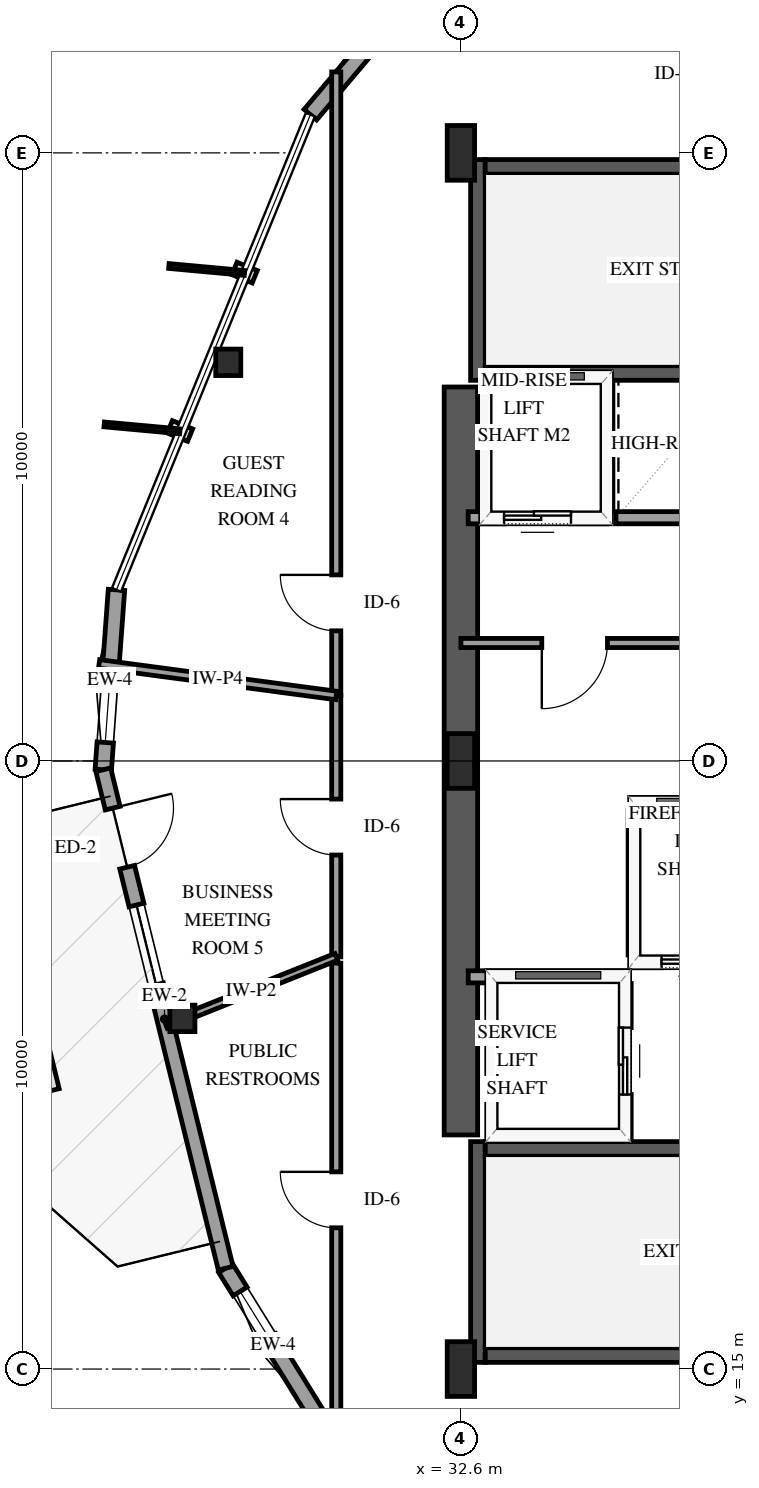
"""IFC4 building model, lengths in metres.
Left out: names, types, materials, properties, quantities, classifications, styles, units other than length and angle.
Written with IfcOpenShell. Run it as: python <this file> out.ifc"""

import sys

from ifc_helpers import new_model, si_unit, direction, frame, frame_2d, origin, origin_2d, place, context, subcontext, project, spatial, rectangle, i_section, extrude, element, fill, save


model = new_model("IFC4")
c1 = context("Model", 3, precision=1e-05, world=origin(), true_north=direction((0.0, 1.0)))
c2 = subcontext(c1, "Body", "Model", "MODEL_VIEW")
j1 = project(units=[si_unit("LENGTHUNIT", "METRE"), si_unit("PLANEANGLEUNIT", "RADIAN")], contexts=[c1])
p1 = place(None, origin())
s1 = spatial("IfcSite", under=j1, at=p1, CompositionType="ELEMENT")
p2 = place(p1, origin())
s2 = spatial("IfcBuilding", under=s1, at=p2, CompositionType="ELEMENT")
p3 = place(p2, frame((0.0, 0.0, 153.4)))
s3 = spatial("IfcBuildingStorey", under=s2, at=p3, CompositionType="ELEMENT", Elevation=153.4)
p4 = place(p3, frame((32.88, 15.11, 0.0), z_axis=(0.0, 0.0, 1.0), x_axis=(0.0, 1.0, 0.0)))
e1 = element("IfcWall", 1, at=p4, inside=s3, PredefinedType="SHEAR", context=c2, shape_type="SweptSolid", body=[
    extrude(rectangle(XDim=3.63, YDim=0.24, at=frame_2d((1.815, 0.0))), origin(), (0.0, 0.0, 1.0), 3.6),
])
for number, where, z_axis, x_axis in (
    (2, (33.0, 15.23, 0.0), (0.0, 0.0, 1.0), (1.0, 0.0, 0.0)),
    (3, (33.0, 18.62, 0.0), (0.0, 0.0, 1.0), (1.0, 0.0, 0.0)),
):
    element("IfcWall", number, at=place(p3, frame(where, z_axis=z_axis, x_axis=x_axis)), inside=s3, PredefinedType="SHEAR", context=c2, shape_type="SweptSolid", body=[
        extrude(rectangle(XDim=8.0, YDim=0.24, at=frame_2d((4.0, 0.0))), origin(), (0.0, 0.0, 1.0), 3.6),
    ])
p5 = place(p3, frame((32.88, 31.26, 0.0), z_axis=(0.0, 0.0, 1.0), x_axis=(0.0, 1.0, 0.0)))
e4 = element("IfcWall", 4, at=p5, inside=s3, PredefinedType="SHEAR", context=c2, shape_type="SweptSolid", body=[
    extrude(rectangle(XDim=3.63, YDim=0.24, at=frame_2d((1.815, 0.0))), origin(), (0.0, 0.0, 1.0), 3.6),
])
for number, where, z_axis, x_axis in (
    (5, (33.0, 31.38, 0.0), (0.0, 0.0, 1.0), (1.0, 0.0, 0.0)),
    (6, (33.0, 34.77, 0.0), (0.0, 0.0, 1.0), (1.0, 0.0, 0.0)),
):
    element("IfcWall", number, at=place(p3, frame(where, z_axis=z_axis, x_axis=x_axis)), inside=s3, PredefinedType="SHEAR", context=c2, shape_type="SweptSolid", body=[
        extrude(rectangle(XDim=8.0, YDim=0.24, at=frame_2d((4.0, 0.0))), origin(), (0.0, 0.0, 1.0), 3.6),
    ])
p6 = place(p3, frame((32.6, 18.85, 0.0), z_axis=(0.0, 0.0, 1.0), x_axis=(0.0, 1.0, 0.0)))
e7 = element("IfcWall", 7, at=p6, inside=s3, PredefinedType="SHEAR", context=c2, shape_type="SweptSolid", body=[
    extrude(rectangle(XDim=12.3, YDim=0.55, at=frame_2d((6.15, 0.0))), origin(), (0.0, 0.0, 1.0), 3.6),
])
for number, where, z_axis, x_axis in (
    (8, (32.6, 15.0, 0.0), (0.0, 0.0, 1.0), (1.0, 0.0, 0.0)),
    (9, (32.6, 25.0, 0.0), (0.0, 0.0, 1.0), (1.0, 0.0, 0.0)),
    (10, (32.6, 35.0, 0.0), (0.0, 0.0, 1.0), (1.0, 0.0, 0.0)),
):
    element("IfcColumn", number, at=place(p3, frame(where, z_axis=z_axis, x_axis=x_axis)), inside=s3, PredefinedType="PILASTER", context=c2, shape_type="SweptSolid", body=[
        extrude(rectangle(XDim=0.45, YDim=0.9, at=origin_2d()), origin(), (0.0, 0.0, 1.0), 3.6),
    ])
for number, where, z_axis, x_axis in (
    (11, (28.774, 31.556, 0.0), (0.0, 0.0, 1.0), (1.0, 0.0, 0.0)),
    (12, (28.02, 20.766, 0.0), (0.0, 0.0, 1.0), (1.0, 0.0, 0.0)),
):
    element("IfcColumn", number, at=place(p3, frame(where, z_axis=z_axis, x_axis=x_axis)), inside=s3, PredefinedType="COLUMN", context=c2, shape_type="SweptSolid", body=[
        extrude(i_section(OverallWidth=0.412, OverallDepth=0.435, WebThickness=0.036, FlangeThickness=0.057, FilletRadius=0.038, at=origin_2d()), origin(), (0.0, 0.0, 1.0), 3.6),
    ])
p7 = place(p3, frame((32.04, 37.894, 0.0), z_axis=(0.0, 0.0, 1.0), x_axis=(-0.645495712839, -0.763763893299, 0.0)))
e13 = element("IfcWall", 13, at=p7, inside=s3, PredefinedType="SOLIDWALL", context=c2, shape_type="SweptSolid", body=[
    extrude(rectangle(XDim=2.966, YDim=0.27, at=frame_2d((1.483, 0.0))), origin(), (0.0, 0.0, 1.0), 2.679),
])
p8 = place(p3, frame((26.936, 27.814, 0.0), z_axis=(0.0, 0.0, 1.0), x_axis=(-0.073247177567, -0.997313817702, 0.0)))
e14 = element("IfcWall", 14, at=p8, inside=s3, PredefinedType="SOLIDWALL", context=c2, shape_type="SweptSolid", body=[
    extrude(rectangle(XDim=2.967, YDim=0.27, at=frame_2d((1.483, 0.0))), origin(), (0.0, 0.0, 1.0), 2.679),
])
p9 = place(p8, frame((1.617, 0.0, 0.75)))
e15 = element("IfcOpeningElement", 15, at=p9, cuts=e14, PredefinedType="OPENING", context=c2, shape_type="SweptSolid", body=[
    extrude(rectangle(XDim=0.9, YDim=1.5, at=frame_2d((0.45, 0.75))), frame((0.0, 0.145, 0.0), z_axis=(0.0, -1.0, 0.0), x_axis=(1.0, 0.0, 0.0)), (0.0, 0.0, 1.0), 0.29),
])
p10 = place(p3, frame((28.732, 16.658, 0.0), z_axis=(0.0, 0.0, 1.0), x_axis=(0.526955124945, -0.849893108746, 0.0)))
e16 = element("IfcWall", 16, at=p10, inside=s3, PredefinedType="SOLIDWALL", context=c2, shape_type="SweptSolid", body=[
    extrude(rectangle(XDim=2.967, YDim=0.27, at=frame_2d((1.483, 0.0))), origin(), (0.0, 0.0, 1.0), 2.679),
])
p11 = place(p10, frame((0.45, 0.0, 0.75)))
e17 = element("IfcOpeningElement", 17, at=p11, cuts=e16, PredefinedType="OPENING", context=c2, shape_type="SweptSolid", body=[
    extrude(rectangle(XDim=0.9, YDim=1.5, at=frame_2d((0.45, 0.75))), frame((0.0, 0.145, 0.0), z_axis=(0.0, -1.0, 0.0), x_axis=(1.0, 0.0, 0.0)), (0.0, 0.0, 1.0), 0.29),
])
p12 = place(p3, frame((26.718, 24.855, 0.0), z_axis=(0.0, 0.0, 1.0), x_axis=(0.238545314463, -0.971131367503, 0.0)))
e18 = element("IfcWall", 18, at=p12, inside=s3, PredefinedType="SOLIDWALL", context=c2, shape_type="SweptSolid", body=[
    extrude(rectangle(XDim=8.44, YDim=0.25, at=frame_2d((4.22, 0.0))), origin(), (0.0, 0.0, 1.0), 2.679),
])
p13 = place(p12, frame((0.65, 0.0, 0.0)))
e19 = element("IfcOpeningElement", 19, at=p13, cuts=e18, PredefinedType="OPENING", context=c2, shape_type="SweptSolid", body=[
    extrude(rectangle(XDim=1.0, YDim=2.15, at=frame_2d((0.5, 1.075))), frame((0.0, 0.135, 0.0), z_axis=(0.0, -1.0, 0.0), x_axis=(1.0, 0.0, 0.0)), (0.0, 0.0, 1.0), 0.27),
])
p14 = place(p12, frame((2.29, 0.0, 0.72)))
e20 = element("IfcOpeningElement", 20, at=p14, cuts=e18, PredefinedType="OPENING", context=c2, shape_type="SweptSolid", body=[
    extrude(rectangle(XDim=1.35, YDim=1.65, at=frame_2d((0.675, 0.825))), frame((0.0, 0.135, 0.0), z_axis=(0.0, -1.0, 0.0), x_axis=(1.0, 0.0, 0.0)), (0.0, 0.0, 1.0), 0.27),
])
p15 = place(p3, frame((35.45, 21.7, 0.0), z_axis=(0.0, 0.0, 1.0), x_axis=(1.0, 0.0, 0.0)))
e21 = element("IfcWall", 21, at=p15, inside=s3, PredefinedType="SOLIDWALL", context=c2, shape_type="SweptSolid", body=[
    extrude(rectangle(XDim=2.0, YDim=0.2, at=frame_2d((1.0, 0.0))), origin(), (0.0, 0.0, 1.0), 3.3),
])
p16 = place(p15, frame((0.45, 0.0, 0.0)))
e22 = element("IfcOpeningElement", 22, at=p16, cuts=e21, PredefinedType="OPENING", context=c2, shape_type="SweptSolid", body=[
    extrude(rectangle(XDim=1.1, YDim=2.15, at=frame_2d((0.55, 1.075))), frame((0.0, 0.11, 0.0), z_axis=(0.0, -1.0, 0.0), x_axis=(1.0, 0.0, 0.0)), (0.0, 0.0, 1.0), 0.22),
])
p17 = place(p3, frame((35.45, 24.3, 0.0), z_axis=(0.0, 0.0, 1.0), x_axis=(1.0, 0.0, 0.0)))
e23 = element("IfcWall", 23, at=p17, inside=s3, PredefinedType="SOLIDWALL", context=c2, shape_type="SweptSolid", body=[
    extrude(rectangle(XDim=2.0, YDim=0.2, at=frame_2d((1.0, 0.0))), origin(), (0.0, 0.0, 1.0), 3.3),
])
p18 = place(p3, frame((35.45, 21.81, 0.0), z_axis=(0.0, 0.0, 1.0), x_axis=(0.0, 1.0, 0.0)))
e24 = element("IfcWall", 24, at=p18, inside=s3, PredefinedType="SOLIDWALL", context=c2, shape_type="SweptSolid", body=[
    extrude(rectangle(XDim=2.38, YDim=0.2, at=frame_2d((1.19, 0.0))), origin(), (0.0, 0.0, 1.0), 3.3),
])
p19 = place(p3, frame((32.72, 21.45, 0.0), z_axis=(0.0, 0.0, 1.0), x_axis=(1.0, 0.0, 0.0)))
e25 = element("IfcWall", 25, at=p19, inside=s3, PredefinedType="SOLIDWALL", context=c2, shape_type="SweptSolid", body=[
    extrude(rectangle(XDim=2.58, YDim=0.2, at=frame_2d((1.29, 0.0))), origin(), (0.0, 0.0, 1.0), 3.3),
])
p20 = place(p3, frame((35.3, 18.79, 0.0), z_axis=(0.0, 0.0, 1.0), x_axis=(0.0, 1.0, 0.0)))
e26 = element("IfcWall", 26, at=p20, inside=s3, PredefinedType="SOLIDWALL", context=c2, shape_type="SweptSolid", body=[
    extrude(rectangle(XDim=2.55, YDim=0.2, at=frame_2d((1.275, 0.0))), origin(), (0.0, 0.0, 1.0), 3.3),
])
p21 = place(p20, frame((0.725, 0.0, 0.0)))
e27 = element("IfcOpeningElement", 27, at=p21, cuts=e26, PredefinedType="OPENING", context=c2, shape_type="SweptSolid", body=[
    extrude(rectangle(XDim=1.1, YDim=2.15, at=frame_2d((0.55, 1.075))), frame((0.0, 0.11, 0.0), z_axis=(0.0, -1.0, 0.0), x_axis=(1.0, 0.0, 0.0)), (0.0, 0.0, 1.0), 0.22),
])
p22 = place(p3, frame((32.72, 29.0, 0.0), z_axis=(0.0, 0.0, 1.0), x_axis=(1.0, 0.0, 0.0)))
e28 = element("IfcWall", 28, at=p22, inside=s3, PredefinedType="SOLIDWALL", context=c2, shape_type="SweptSolid", body=[
    extrude(rectangle(XDim=2.28, YDim=0.2, at=frame_2d((1.14, 0.0))), origin(), (0.0, 0.0, 1.0), 3.3),
])
p23 = place(p22, frame((0.59, 0.0, 0.0)))
e29 = element("IfcOpeningElement", 29, at=p23, cuts=e28, PredefinedType="OPENING", context=c2, shape_type="SweptSolid", body=[
    extrude(rectangle(XDim=1.1, YDim=2.15, at=frame_2d((0.55, 1.075))), frame((0.0, 0.11, 0.0), z_axis=(0.0, -1.0, 0.0), x_axis=(1.0, 0.0, 0.0)), (0.0, 0.0, 1.0), 0.22),
])
p24 = place(p3, frame((35.0, 29.11, 0.0), z_axis=(0.0, 0.0, 1.0), x_axis=(0.0, 1.0, 0.0)))
e30 = element("IfcWall", 30, at=p24, inside=s3, PredefinedType="SOLIDWALL", context=c2, shape_type="SweptSolid", body=[
    extrude(rectangle(XDim=2.1, YDim=0.2, at=frame_2d((1.05, 0.0))), origin(), (0.0, 0.0, 1.0), 3.3),
])
p25 = place(p3, frame((35.15, 29.0, 0.0), z_axis=(0.0, 0.0, 1.0), x_axis=(1.0, 0.0, 0.0)))
e31 = element("IfcWall", 31, at=p25, inside=s3, PredefinedType="SOLIDWALL", context=c2, shape_type="SweptSolid", body=[
    extrude(rectangle(XDim=2.0, YDim=0.2, at=frame_2d((1.0, 0.0))), origin(), (0.0, 0.0, 1.0), 3.3),
])
p26 = place(p3, frame((30.55, 26.077, 0.0), z_axis=(0.0, 0.0, 1.0), x_axis=(0.0, 1.0, 0.0)))
e32 = element("IfcWall", 32, at=p26, inside=s3, PredefinedType="PARTITIONING", context=c2, shape_type="SweptSolid", body=[
    extrude(rectangle(XDim=10.254, YDim=0.15, at=frame_2d((5.127, 0.0))), origin(), (0.0, 0.0, 1.0), 3.3),
])
p27 = place(p26, frame((1.063, 0.0, 0.0)))
e33 = element("IfcOpeningElement", 33, at=p27, cuts=e32, PredefinedType="OPENING", context=c2, shape_type="SweptSolid", body=[
    extrude(rectangle(XDim=0.92, YDim=2.12, at=frame_2d((0.46, 1.06))), frame((0.0, 0.085, 0.0), z_axis=(0.0, -1.0, 0.0), x_axis=(1.0, 0.0, 0.0)), (0.0, 0.0, 1.0), 0.17),
])
p28 = place(p3, frame((30.55, 13.922, 0.0), z_axis=(0.0, 0.0, 1.0), x_axis=(0.0, 1.0, 0.0)))
e34 = element("IfcWall", 34, at=p28, inside=s3, PredefinedType="PARTITIONING", context=c2, shape_type="SweptSolid", body=[
    extrude(rectangle(XDim=7.753, YDim=0.15, at=frame_2d((3.876, 0.0))), origin(), (0.0, 0.0, 1.0), 3.3),
])
p29 = place(p28, frame((3.401, 0.0, 0.0)))
e35 = element("IfcOpeningElement", 35, at=p29, cuts=e34, PredefinedType="OPENING", context=c2, shape_type="SweptSolid", body=[
    extrude(rectangle(XDim=0.92, YDim=2.12, at=frame_2d((0.46, 1.06))), frame((0.0, 0.085, 0.0), z_axis=(0.0, -1.0, 0.0), x_axis=(1.0, 0.0, 0.0)), (0.0, 0.0, 1.0), 0.17),
])
p30 = place(p3, frame((30.55, 21.778, 0.0), z_axis=(0.0, 0.0, 1.0), x_axis=(0.0, 1.0, 0.0)))
e36 = element("IfcWall", 36, at=p30, inside=s3, PredefinedType="PARTITIONING", context=c2, shape_type="SweptSolid", body=[
    extrude(rectangle(XDim=4.299, YDim=0.15, at=frame_2d((2.149, 0.0))), origin(), (0.0, 0.0, 1.0), 3.3),
])
p31 = place(p30, frame((1.675, 0.0, 0.0)))
e37 = element("IfcOpeningElement", 37, at=p31, cuts=e36, PredefinedType="OPENING", context=c2, shape_type="SweptSolid", body=[
    extrude(rectangle(XDim=0.92, YDim=2.12, at=frame_2d((0.46, 1.06))), frame((0.0, 0.085, 0.0), z_axis=(0.0, -1.0, 0.0), x_axis=(1.0, 0.0, 0.0)), (0.0, 0.0, 1.0), 0.17),
])
p32 = place(p3, frame((30.55, 26.077, 0.0), z_axis=(0.0, 0.0, 1.0), x_axis=(-0.991227900683, 0.132163720091, 0.0)))
e38 = element("IfcWall", 38, at=p32, inside=s3, PredefinedType="PARTITIONING", context=c2, shape_type="SweptSolid", body=[
    extrude(rectangle(XDim=3.935, YDim=0.14, at=frame_2d((1.967, 0.0))), origin(), (0.0, 0.0, 1.0), 3.3),
])
p33 = place(p3, frame((36.34, 26.94, 0.0), z_axis=(0.0, 0.0, 1.0), x_axis=(-1.0, 0.0, 0.0)))
e39 = element("IfcWall", 39, at=p33, inside=s3, PredefinedType="PARTITIONING", context=c2, shape_type="SweptSolid", body=[
    extrude(rectangle(XDim=3.74, YDim=0.15, at=frame_2d((1.87, 0.0))), origin(), (0.0, 0.0, 1.0), 3.3),
])
p34 = place(p33, frame((1.33, 0.0, 0.0)))
e40 = element("IfcOpeningElement", 40, at=p34, cuts=e39, PredefinedType="OPENING", context=c2, shape_type="SweptSolid", body=[
    extrude(rectangle(XDim=1.08, YDim=2.15, at=frame_2d((0.54, 1.075))), frame((0.0, 0.085, 0.0), z_axis=(0.0, -1.0, 0.0), x_axis=(1.0, 0.0, 0.0)), (0.0, 0.0, 1.0), 0.17),
])
p35 = place(p3, frame((30.55, 21.778, 0.0), z_axis=(0.0, 0.0, 1.0), x_axis=(-0.928621753336, -0.371027814634, 0.0)))
e41 = element("IfcWall", 41, at=p35, inside=s3, PredefinedType="PARTITIONING", context=c2, shape_type="SweptSolid", body=[
    extrude(rectangle(XDim=3.016, YDim=0.12, at=frame_2d((1.508, 0.0))), origin(), (0.0, 0.0, 1.0), 3.3),
])
p36 = place(p9, origin())
e42 = element("IfcWindow", 42, at=p36, inside=s3, PartitioningType="SINGLE_PANEL", PredefinedType="WINDOW", context=c2, shape_type="SweptSolid", body=[
    extrude(rectangle(XDim=0.9, YDim=1.5, at=frame_2d((0.45, 0.75))), frame((0.0, 0.03, 0.0), z_axis=(0.0, -1.0, 0.0), x_axis=(1.0, 0.0, 0.0)), (0.0, 0.0, 1.0), 0.06),
])
fill(e15, e42)
p37 = place(p11, origin())
e43 = element("IfcWindow", 43, at=p37, inside=s3, PartitioningType="SINGLE_PANEL", PredefinedType="WINDOW", context=c2, shape_type="SweptSolid", body=[
    extrude(rectangle(XDim=0.9, YDim=1.5, at=frame_2d((0.45, 0.75))), frame((0.0, 0.03, 0.0), z_axis=(0.0, -1.0, 0.0), x_axis=(1.0, 0.0, 0.0)), (0.0, 0.0, 1.0), 0.06),
])
fill(e17, e43)
p38 = place(p13, origin())
e44 = element("IfcDoor", 44, at=p38, inside=s3, OperationType="SINGLE_SWING_LEFT", PredefinedType="DOOR", context=c2, shape_type="SweptSolid", body=[
    extrude(rectangle(XDim=1.0, YDim=2.15, at=frame_2d((0.5, 1.075))), frame((0.0, 0.025, 0.0), z_axis=(0.0, -1.0, 0.0), x_axis=(1.0, 0.0, 0.0)), (0.0, 0.0, 1.0), 0.05),
])
fill(e19, e44)
p39 = place(p14, origin())
e45 = element("IfcWindow", 45, at=p39, inside=s3, PartitioningType="SINGLE_PANEL", PredefinedType="WINDOW", context=c2, shape_type="SweptSolid", body=[
    extrude(rectangle(XDim=1.35, YDim=1.65, at=frame_2d((0.675, 0.825))), frame((0.0, 0.03, 0.0), z_axis=(0.0, -1.0, 0.0), x_axis=(1.0, 0.0, 0.0)), (0.0, 0.0, 1.0), 0.06),
])
fill(e20, e45)
p40 = place(p16, origin())
e46 = element("IfcDoor", 46, at=p40, inside=s3, OperationType="SLIDING_TO_LEFT", PredefinedType="DOOR", context=c2, shape_type="SweptSolid", body=[
    extrude(rectangle(XDim=1.1, YDim=2.15, at=frame_2d((0.55, 1.075))), frame((0.0, 0.025, 0.0), z_axis=(0.0, -1.0, 0.0), x_axis=(1.0, 0.0, 0.0)), (0.0, 0.0, 1.0), 0.05),
])
fill(e22, e46)
p41 = place(p21, origin())
e47 = element("IfcDoor", 47, at=p41, inside=s3, OperationType="SLIDING_TO_LEFT", PredefinedType="DOOR", context=c2, shape_type="SweptSolid", body=[
    extrude(rectangle(XDim=1.1, YDim=2.15, at=frame_2d((0.55, 1.075))), frame((0.0, 0.025, 0.0), z_axis=(0.0, -1.0, 0.0), x_axis=(1.0, 0.0, 0.0)), (0.0, 0.0, 1.0), 0.05),
])
fill(e27, e47)
p42 = place(p23, origin())
e48 = element("IfcDoor", 48, at=p42, inside=s3, OperationType="SLIDING_TO_LEFT", PredefinedType="DOOR", context=c2, shape_type="SweptSolid", body=[
    extrude(rectangle(XDim=1.1, YDim=2.15, at=frame_2d((0.55, 1.075))), frame((0.0, 0.025, 0.0), z_axis=(0.0, -1.0, 0.0), x_axis=(1.0, 0.0, 0.0)), (0.0, 0.0, 1.0), 0.05),
])
fill(e29, e48)
p43 = place(p27, origin())
e49 = element("IfcDoor", 49, at=p43, inside=s3, OperationType="SINGLE_SWING_RIGHT", PredefinedType="DOOR", context=c2, shape_type="SweptSolid", body=[
    extrude(rectangle(XDim=0.92, YDim=2.12, at=frame_2d((0.46, 1.06))), frame((0.0, 0.025, 0.0), z_axis=(0.0, -1.0, 0.0), x_axis=(1.0, 0.0, 0.0)), (0.0, 0.0, 1.0), 0.05),
])
fill(e33, e49)
p44 = place(p29, origin())
e50 = element("IfcDoor", 50, at=p44, inside=s3, OperationType="SINGLE_SWING_RIGHT", PredefinedType="DOOR", context=c2, shape_type="SweptSolid", body=[
    extrude(rectangle(XDim=0.92, YDim=2.12, at=frame_2d((0.46, 1.06))), frame((0.0, 0.025, 0.0), z_axis=(0.0, -1.0, 0.0), x_axis=(1.0, 0.0, 0.0)), (0.0, 0.0, 1.0), 0.05),
])
fill(e35, e50)
p45 = place(p31, origin())
e51 = element("IfcDoor", 51, at=p45, inside=s3, OperationType="SINGLE_SWING_RIGHT", PredefinedType="DOOR", context=c2, shape_type="SweptSolid", body=[
    extrude(rectangle(XDim=0.92, YDim=2.12, at=frame_2d((0.46, 1.06))), frame((0.0, 0.025, 0.0), z_axis=(0.0, -1.0, 0.0), x_axis=(1.0, 0.0, 0.0)), (0.0, 0.0, 1.0), 0.05),
])
fill(e37, e51)
p46 = place(p34, origin())
e52 = element("IfcDoor", 52, at=p46, inside=s3, OperationType="SINGLE_SWING_RIGHT", PredefinedType="DOOR", context=c2, shape_type="SweptSolid", body=[
    extrude(rectangle(XDim=1.08, YDim=2.15, at=frame_2d((0.54, 1.075))), frame((0.0, 0.025, 0.0), z_axis=(0.0, -1.0, 0.0), x_axis=(1.0, 0.0, 0.0)), (0.0, 0.0, 1.0), 0.05),
])
fill(e40, e52)
save(model, sys.argv[1])
